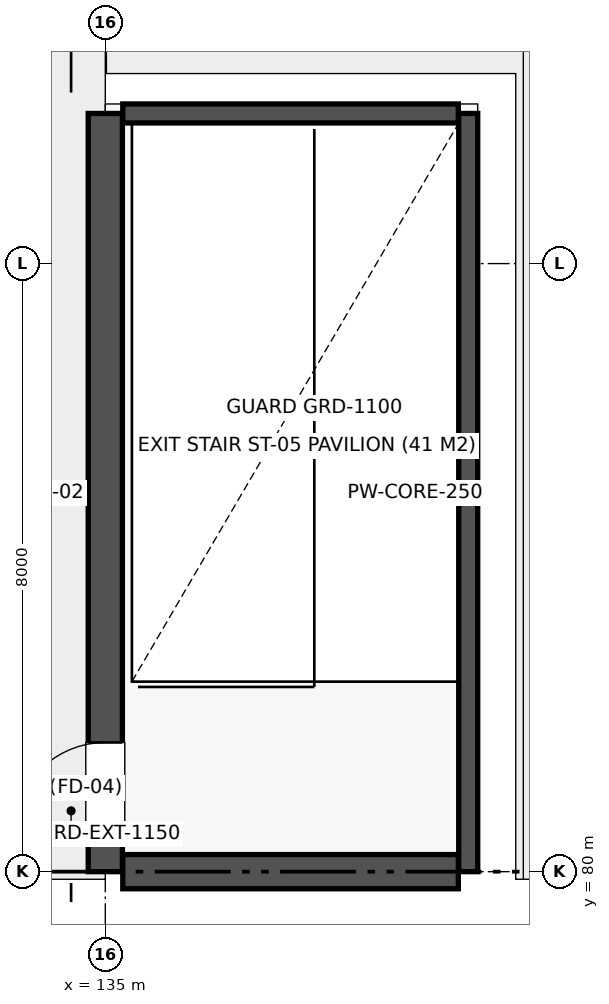
"""IFC4 building model, lengths in metres.
Left out: names, types, materials, properties, quantities, classifications, styles, units other than length and angle.
Written with IfcOpenShell. Run it as: python <this file> out.ifc"""

import sys

from ifc_helpers import new_model, si_unit, direction, frame, frame_2d, origin, place, context, subcontext, project, spatial, rectangle, extrude, element, fill, save


model = new_model("IFC4")
c1 = context("Model", 3, precision=1e-05, world=origin(), true_north=direction((0.0, 1.0)))
c2 = subcontext(c1, "Body", "Model", "MODEL_VIEW")
j1 = project(units=[si_unit("LENGTHUNIT", "METRE"), si_unit("PLANEANGLEUNIT", "RADIAN")], contexts=[c1])
p1 = place(None, origin())
s1 = spatial("IfcSite", under=j1, at=p1, CompositionType="ELEMENT")
p2 = place(p1, origin())
s2 = spatial("IfcBuilding", under=s1, at=p2, CompositionType="ELEMENT")
p3 = place(p2, frame((0.0, 0.0, 18.0)))
s3 = spatial("IfcBuildingStorey", under=s2, at=p3, CompositionType="ELEMENT", Elevation=18.0)
p4 = place(p3, frame((135.0, 80.0, 0.0), z_axis=(0.0, 0.0, 1.0), x_axis=(0.0, 1.0, 0.0)))
e1 = element("IfcWall", 1, at=p4, inside=s3, PredefinedType="SHEAR", context=c2, shape_type="SweptSolid", body=[
    extrude(rectangle(XDim=9.975, YDim=0.45, at=frame_2d((4.988, 0.0))), origin(), (0.0, 0.0, 1.0), 3.38),
])
p5 = place(p4, frame((0.5, 0.0, 0.0)))
e2 = element("IfcOpeningElement", 2, at=p5, cuts=e1, PredefinedType="OPENING", context=c2, shape_type="SweptSolid", body=[
    extrude(rectangle(XDim=1.2, YDim=2.15, at=frame_2d((0.6, 1.075))), frame((0.0, 0.237, 0.0), z_axis=(0.0, -1.0, 0.0), x_axis=(1.0, 0.0, 0.0)), (0.0, 0.0, 1.0), 0.474),
])
p6 = place(p3, frame((139.775, 80.0, 0.0), z_axis=(0.0, 0.0, 1.0), x_axis=(0.0, 1.0, 0.0)))
e3 = element("IfcWall", 3, at=p6, inside=s3, PredefinedType="SOLIDWALL", context=c2, shape_type="SweptSolid", body=[
    extrude(rectangle(XDim=9.975, YDim=0.25, at=frame_2d((4.988, 0.0))), origin(), (0.0, 0.0, 1.0), 3.38),
])
p7 = place(p3, frame((135.23, 80.0, 0.0), z_axis=(0.0, 0.0, 1.0), x_axis=(1.0, 0.0, 0.0)))
e4 = element("IfcWall", 4, at=p7, inside=s3, PredefinedType="SHEAR", context=c2, shape_type="SweptSolid", body=[
    extrude(rectangle(XDim=4.415, YDim=0.45, at=frame_2d((2.208, 0.0))), origin(), (0.0, 0.0, 1.0), 3.38),
])
p8 = place(p3, frame((135.23, 89.975, 0.0), z_axis=(0.0, 0.0, 1.0), x_axis=(1.0, 0.0, 0.0)))
e5 = element("IfcWall", 5, at=p8, inside=s3, PredefinedType="SOLIDWALL", context=c2, shape_type="SweptSolid", body=[
    extrude(rectangle(XDim=4.415, YDim=0.25, at=frame_2d((2.208, 0.0))), origin(), (0.0, 0.0, 1.0), 3.38),
])
p9 = place(p5, origin())
e6 = element("IfcDoor", 6, at=p9, inside=s3, OperationType="SINGLE_SWING_LEFT", PredefinedType="DOOR", context=c2, shape_type="SweptSolid", body=[
    extrude(rectangle(XDim=1.2, YDim=2.15, at=frame_2d((0.6, 1.075))), frame((0.0, 0.025, 0.0), z_axis=(0.0, -1.0, 0.0), x_axis=(1.0, 0.0, 0.0)), (0.0, 0.0, 1.0), 0.05),
])
fill(e2, e6)
save(model, sys.argv[1])
